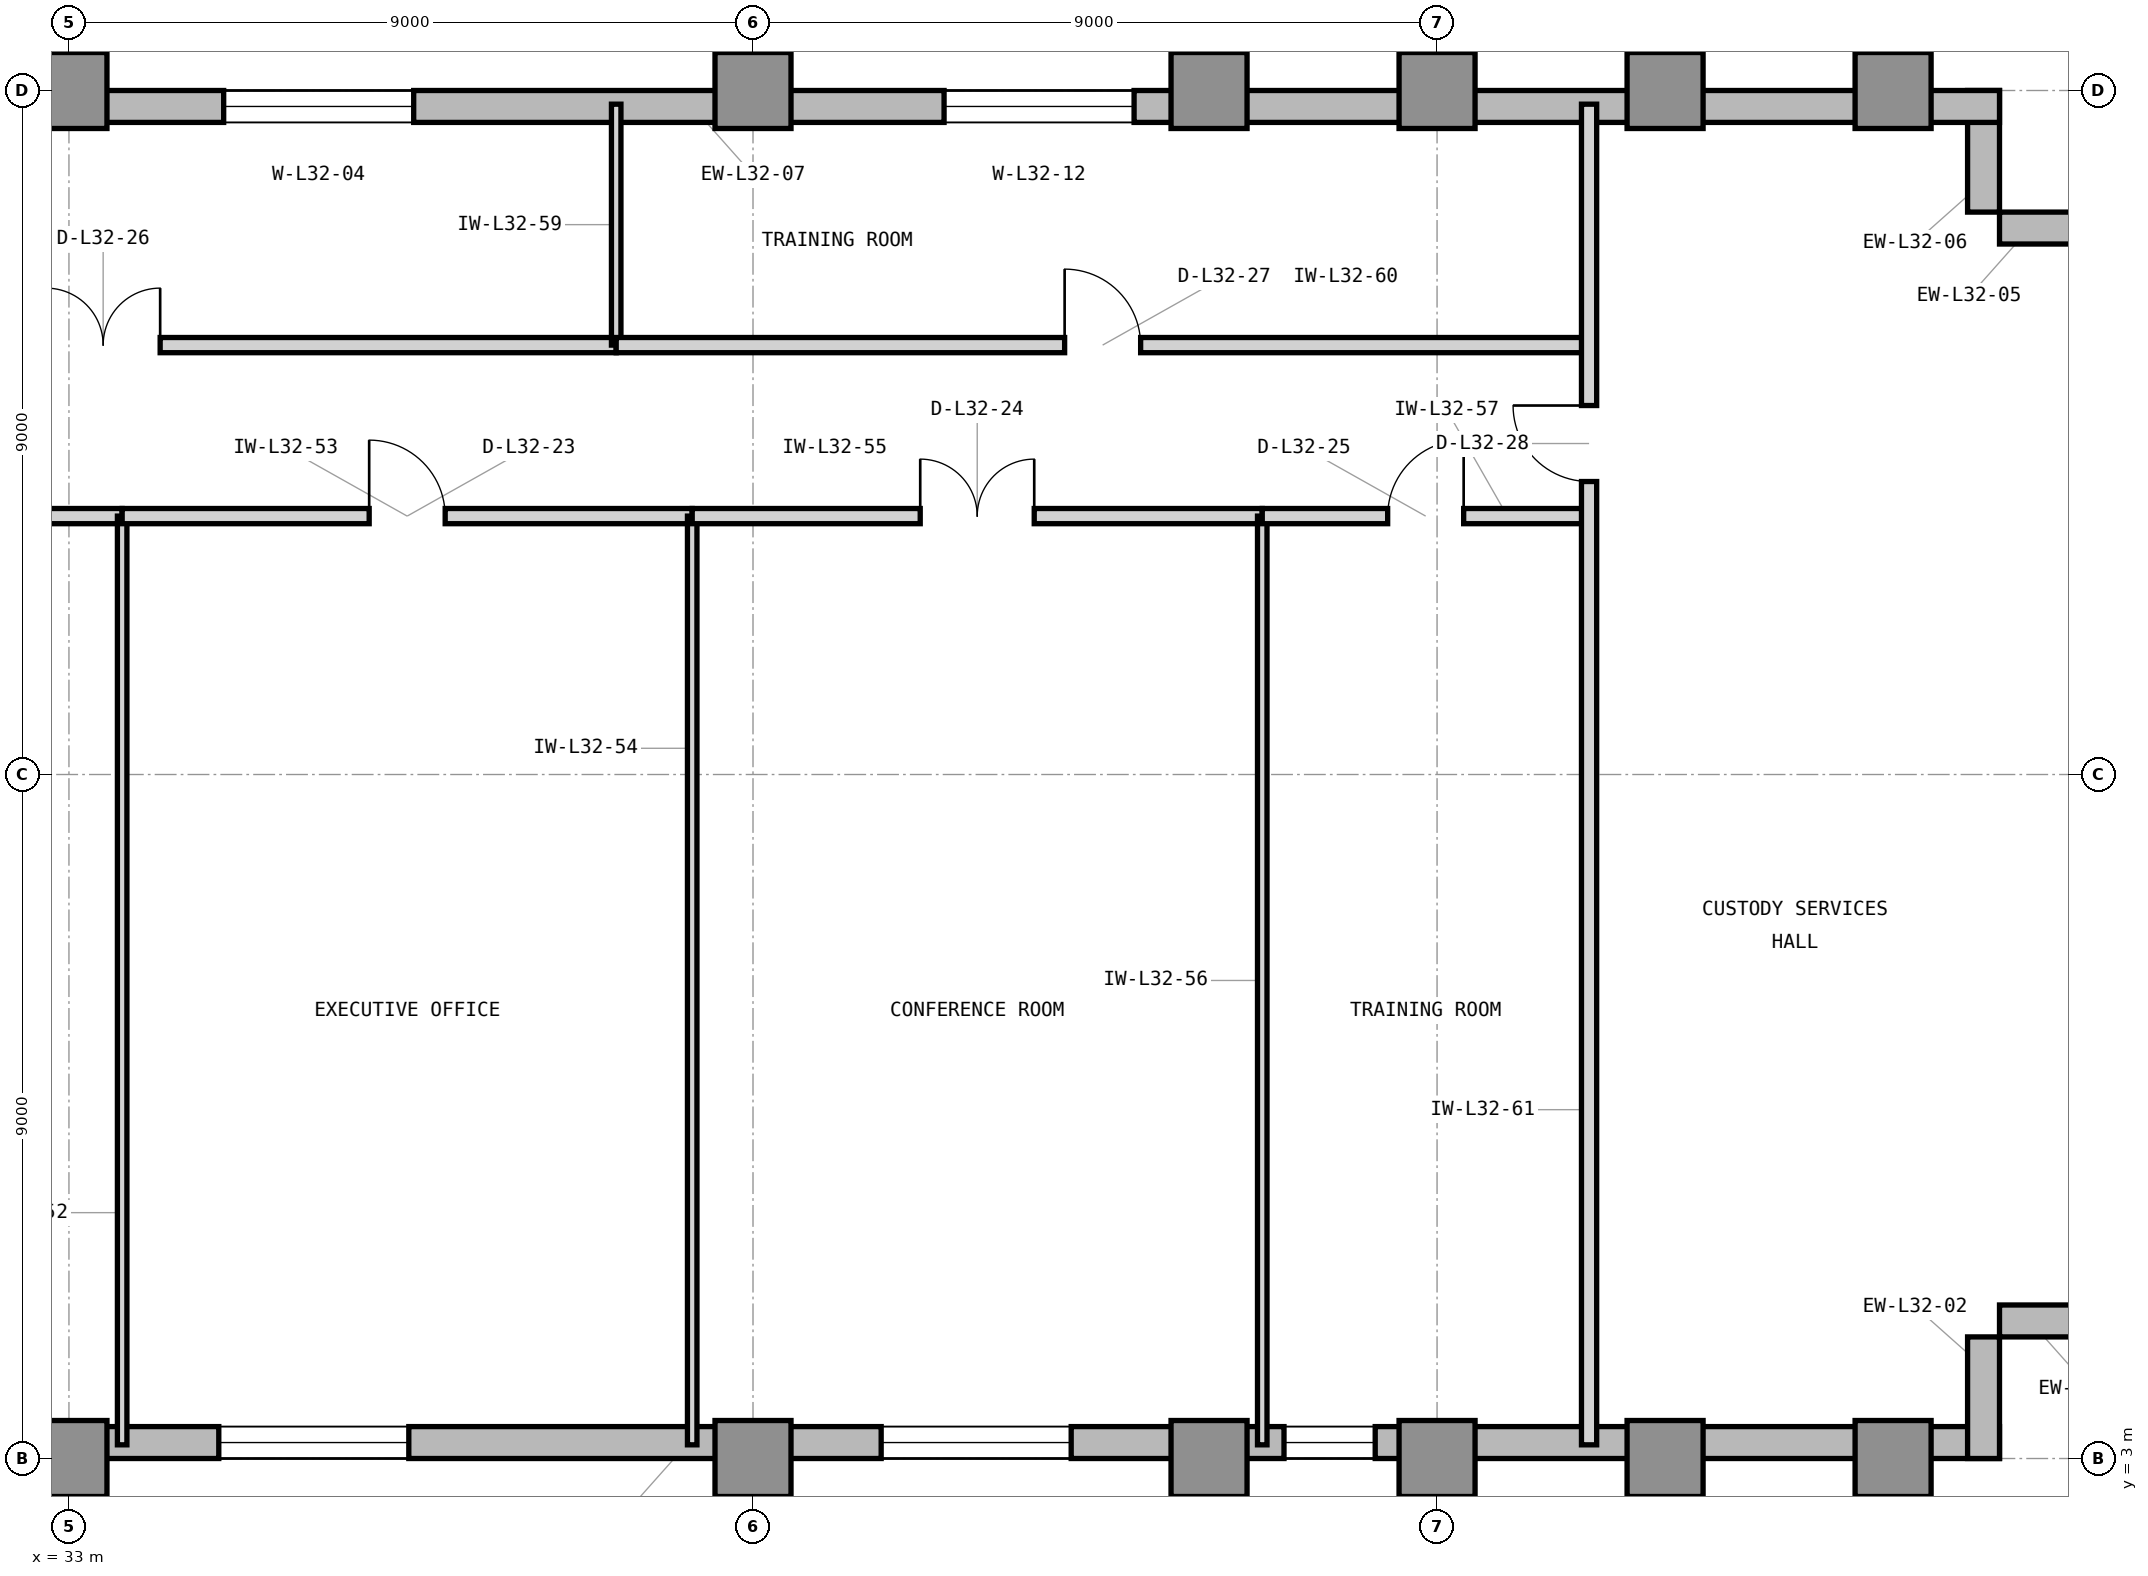
"""IFC4 building model, lengths in metres.
Left out: names, types, materials, properties, quantities, classifications, styles, units other than length and angle.
Written with IfcOpenShell. Run it as: python <this file> out.ifc"""

import sys

from ifc_helpers import new_model, si_unit, direction, frame, frame_2d, origin, origin_2d, place, context, subcontext, project, spatial, rectangle, extrude, element, fill, save


model = new_model("IFC4")
c1 = context("Model", 3, precision=1e-05, world=origin(), true_north=direction((0.0, 1.0)))
c2 = subcontext(c1, "Body", "Model", "MODEL_VIEW")
j1 = project(units=[si_unit("LENGTHUNIT", "METRE"), si_unit("PLANEANGLEUNIT", "RADIAN")], contexts=[c1])
p1 = place(None, origin())
s1 = spatial("IfcSite", under=j1, at=p1, CompositionType="ELEMENT")
p2 = place(p1, origin())
s2 = spatial("IfcBuilding", under=s1, at=p2, CompositionType="ELEMENT")
p3 = place(p2, frame((0.0, 0.0, 136.2)))
s3 = spatial("IfcBuildingStorey", under=s2, at=p3, CompositionType="ELEMENT", Elevation=136.2)
for number, where, z_axis, x_axis in (
    (1, (33.0, 3.0, 0.0), (0.0, 0.0, 1.0), (1.0, 0.0, 0.0)),
    (2, (33.0, 21.0, 0.0), (0.0, 0.0, 1.0), (1.0, 0.0, 0.0)),
    (3, (42.0, 3.0, 0.0), (0.0, 0.0, 1.0), (1.0, 0.0, 0.0)),
    (4, (42.0, 21.0, 0.0), (0.0, 0.0, 1.0), (1.0, 0.0, 0.0)),
    (5, (48.0, 3.0, 0.0), (0.0, 0.0, 1.0), (1.0, 0.0, 0.0)),
    (6, (48.0, 21.0, 0.0), (0.0, 0.0, 1.0), (1.0, 0.0, 0.0)),
    (7, (51.0, 3.0, 0.0), (0.0, 0.0, 1.0), (1.0, 0.0, 0.0)),
    (8, (51.0, 21.0, 0.0), (0.0, 0.0, 1.0), (1.0, 0.0, 0.0)),
    (9, (54.0, 3.0, 0.0), (0.0, 0.0, 1.0), (1.0, 0.0, 0.0)),
    (10, (54.0, 21.0, 0.0), (0.0, 0.0, 1.0), (1.0, 0.0, 0.0)),
    (11, (57.0, 3.0, 0.0), (0.0, 0.0, 1.0), (1.0, 0.0, 0.0)),
    (12, (57.0, 21.0, 0.0), (0.0, 0.0, 1.0), (1.0, 0.0, 0.0)),
):
    element("IfcColumn", number, at=place(p3, frame(where, z_axis=z_axis, x_axis=x_axis)), inside=s3, PredefinedType="COLUMN", context=c2, shape_type="SweptSolid", body=[
        extrude(rectangle(XDim=1.0, YDim=1.0, at=origin_2d()), origin(), (0.0, 0.0, 1.0), 3.9),
    ])
p4 = place(p3, frame((23.9, 3.21, 0.0), z_axis=(0.0, 0.0, 1.0), x_axis=(1.0, 0.0, 0.0)))
e13 = element("IfcWall", 13, at=p4, inside=s3, PredefinedType="STANDARD", context=c2, shape_type="SweptSolid", body=[
    extrude(rectangle(XDim=34.5, YDim=0.42, at=frame_2d((17.25, 0.0))), origin(), (0.0, 0.0, 1.0), 3.7),
])
p5 = place(p4, frame((11.071, 0.0, 0.85)))
e14 = element("IfcOpeningElement", 14, at=p5, cuts=e13, PredefinedType="OPENING", context=c2, shape_type="SweptSolid", body=[
    extrude(rectangle(XDim=2.5, YDim=2.25, at=frame_2d((1.25, 1.125))), frame((0.0, 0.22, 0.0), z_axis=(0.0, -1.0, 0.0), x_axis=(1.0, 0.0, 0.0)), (0.0, 0.0, 1.0), 0.44),
])
p6 = place(p4, frame((1.1, 0.0, 0.85)))
e15 = element("IfcOpeningElement", 15, at=p6, cuts=e13, PredefinedType="OPENING", context=c2, shape_type="SweptSolid", body=[
    extrude(rectangle(XDim=1.2, YDim=2.25, at=frame_2d((0.6, 1.125))), frame((0.0, 0.22, 0.0), z_axis=(0.0, -1.0, 0.0), x_axis=(1.0, 0.0, 0.0)), (0.0, 0.0, 1.0), 0.44),
])
p7 = place(p4, frame((5.036, 0.0, 0.85)))
e16 = element("IfcOpeningElement", 16, at=p7, cuts=e13, PredefinedType="OPENING", context=c2, shape_type="SweptSolid", body=[
    extrude(rectangle(XDim=2.5, YDim=2.25, at=frame_2d((1.25, 1.125))), frame((0.0, 0.22, 0.0), z_axis=(0.0, -1.0, 0.0), x_axis=(1.0, 0.0, 0.0)), (0.0, 0.0, 1.0), 0.44),
])
p8 = place(p4, frame((19.786, 0.0, 0.85)))
e17 = element("IfcOpeningElement", 17, at=p8, cuts=e13, PredefinedType="OPENING", context=c2, shape_type="SweptSolid", body=[
    extrude(rectangle(XDim=2.5, YDim=2.25, at=frame_2d((1.25, 1.125))), frame((0.0, 0.22, 0.0), z_axis=(0.0, -1.0, 0.0), x_axis=(1.0, 0.0, 0.0)), (0.0, 0.0, 1.0), 0.44),
])
p9 = place(p4, frame((25.086, 0.0, 0.85)))
e18 = element("IfcOpeningElement", 18, at=p9, cuts=e13, PredefinedType="OPENING", context=c2, shape_type="SweptSolid", body=[
    extrude(rectangle(XDim=1.2, YDim=2.25, at=frame_2d((0.6, 1.125))), frame((0.0, 0.22, 0.0), z_axis=(0.0, -1.0, 0.0), x_axis=(1.0, 0.0, 0.0)), (0.0, 0.0, 1.0), 0.44),
])
for number, where, z_axis, x_axis in (
    (19, (58.19, 3.0, 0.0), (0.0, 0.0, 1.0), (0.0, 1.0, 0.0)),
    (20, (58.4, 4.81, 0.0), (0.0, 0.0, 1.0), (1.0, 0.0, 0.0)),
    (21, (60.0, 19.19, 0.0), (0.0, 0.0, 1.0), (-1.0, 0.0, 0.0)),
    (22, (58.19, 19.4, 0.0), (0.0, 0.0, 1.0), (0.0, 1.0, 0.0)),
):
    element("IfcWall", number, at=place(p3, frame(where, z_axis=z_axis, x_axis=x_axis)), inside=s3, PredefinedType="STANDARD", context=c2, shape_type="SweptSolid", body=[
        extrude(rectangle(XDim=1.6, YDim=0.42, at=frame_2d((0.8, 0.0))), origin(), (0.0, 0.0, 1.0), 3.7),
    ])
p10 = place(p3, frame((58.4, 20.79, 0.0), z_axis=(0.0, 0.0, 1.0), x_axis=(-1.0, 0.0, 0.0)))
e23 = element("IfcWall", 23, at=p10, inside=s3, PredefinedType="STANDARD", context=c2, shape_type="SweptSolid", body=[
    extrude(rectangle(XDim=34.4, YDim=0.42, at=frame_2d((17.2, 0.0))), origin(), (0.0, 0.0, 1.0), 3.7),
])
p11 = place(p10, frame((20.864, 0.0, 0.85)))
e24 = element("IfcOpeningElement", 24, at=p11, cuts=e23, PredefinedType="OPENING", context=c2, shape_type="SweptSolid", body=[
    extrude(rectangle(XDim=2.5, YDim=2.25, at=frame_2d((1.25, 1.125))), frame((0.0, 0.22, 0.0), z_axis=(0.0, -1.0, 0.0), x_axis=(1.0, 0.0, 0.0)), (0.0, 0.0, 1.0), 0.44),
])
p12 = place(p10, frame((11.386, 0.0, 0.85)))
e25 = element("IfcOpeningElement", 25, at=p12, cuts=e23, PredefinedType="OPENING", context=c2, shape_type="SweptSolid", body=[
    extrude(rectangle(XDim=2.5, YDim=2.25, at=frame_2d((1.25, 1.125))), frame((0.0, 0.22, 0.0), z_axis=(0.0, -1.0, 0.0), x_axis=(1.0, 0.0, 0.0)), (0.0, 0.0, 1.0), 0.44),
])
p13 = place(p3, frame((26.7, 15.4, 0.0), z_axis=(0.0, 0.0, 1.0), x_axis=(1.0, 0.0, 0.0)))
e26 = element("IfcWall", 26, at=p13, inside=s3, PredefinedType="PARTITIONING", context=c2, shape_type="SweptSolid", body=[
    extrude(rectangle(XDim=7.0, YDim=0.2, at=frame_2d((3.5, 0.0))), origin(), (0.0, 0.0, 1.0), 3.69),
])
p14 = place(p13, frame((2.5, 0.0, 0.0)))
e27 = element("IfcOpeningElement", 27, at=p14, cuts=e26, PredefinedType="OPENING", context=c2, shape_type="SweptSolid", body=[
    extrude(rectangle(XDim=2.0, YDim=2.5, at=frame_2d((1.0, 1.25))), frame((0.0, 0.11, 0.0), z_axis=(0.0, -1.0, 0.0), x_axis=(1.0, 0.0, 0.0)), (0.0, 0.0, 1.0), 0.22),
])
p15 = place(p3, frame((33.7, 3.18, 0.0), z_axis=(0.0, 0.0, 1.0), x_axis=(0.0, 1.0, 0.0)))
e28 = element("IfcWall", 28, at=p15, inside=s3, PredefinedType="PARTITIONING", context=c2, shape_type="SweptSolid", body=[
    extrude(rectangle(XDim=12.22, YDim=0.125, at=frame_2d((6.11, 0.0))), origin(), (0.0, 0.0, 1.0), 3.69),
])
p16 = place(p3, frame((33.7, 15.4, 0.0), z_axis=(0.0, 0.0, 1.0), x_axis=(1.0, 0.0, 0.0)))
e29 = element("IfcWall", 29, at=p16, inside=s3, PredefinedType="PARTITIONING", context=c2, shape_type="SweptSolid", body=[
    extrude(rectangle(XDim=7.5, YDim=0.2, at=frame_2d((3.75, 0.0))), origin(), (0.0, 0.0, 1.0), 3.69),
])
p17 = place(p16, frame((3.25, 0.0, 0.0)))
e30 = element("IfcOpeningElement", 30, at=p17, cuts=e29, PredefinedType="OPENING", context=c2, shape_type="SweptSolid", body=[
    extrude(rectangle(XDim=1.0, YDim=2.15, at=frame_2d((0.5, 1.075))), frame((0.0, 0.11, 0.0), z_axis=(0.0, -1.0, 0.0), x_axis=(1.0, 0.0, 0.0)), (0.0, 0.0, 1.0), 0.22),
])
p18 = place(p3, frame((41.2, 3.18, 0.0), z_axis=(0.0, 0.0, 1.0), x_axis=(0.0, 1.0, 0.0)))
e31 = element("IfcWall", 31, at=p18, inside=s3, PredefinedType="PARTITIONING", context=c2, shape_type="SweptSolid", body=[
    extrude(rectangle(XDim=12.22, YDim=0.125, at=frame_2d((6.11, 0.0))), origin(), (0.0, 0.0, 1.0), 3.69),
])
p19 = place(p3, frame((41.2, 15.4, 0.0), z_axis=(0.0, 0.0, 1.0), x_axis=(1.0, 0.0, 0.0)))
e32 = element("IfcWall", 32, at=p19, inside=s3, PredefinedType="PARTITIONING", context=c2, shape_type="SweptSolid", body=[
    extrude(rectangle(XDim=7.5, YDim=0.2, at=frame_2d((3.75, 0.0))), origin(), (0.0, 0.0, 1.0), 3.69),
])
p20 = place(p19, frame((3.0, 0.0, 0.0)))
e33 = element("IfcOpeningElement", 33, at=p20, cuts=e32, PredefinedType="OPENING", context=c2, shape_type="SweptSolid", body=[
    extrude(rectangle(XDim=1.5, YDim=2.3, at=frame_2d((0.75, 1.15))), frame((0.0, 0.11, 0.0), z_axis=(0.0, -1.0, 0.0), x_axis=(1.0, 0.0, 0.0)), (0.0, 0.0, 1.0), 0.22),
])
p21 = place(p3, frame((48.7, 3.18, 0.0), z_axis=(0.0, 0.0, 1.0), x_axis=(0.0, 1.0, 0.0)))
e34 = element("IfcWall", 34, at=p21, inside=s3, PredefinedType="PARTITIONING", context=c2, shape_type="SweptSolid", body=[
    extrude(rectangle(XDim=12.22, YDim=0.125, at=frame_2d((6.11, 0.0))), origin(), (0.0, 0.0, 1.0), 3.69),
])
p22 = place(p3, frame((48.7, 15.4, 0.0), z_axis=(0.0, 0.0, 1.0), x_axis=(1.0, 0.0, 0.0)))
e35 = element("IfcWall", 35, at=p22, inside=s3, PredefinedType="PARTITIONING", context=c2, shape_type="SweptSolid", body=[
    extrude(rectangle(XDim=4.3, YDim=0.2, at=frame_2d((2.15, 0.0))), origin(), (0.0, 0.0, 1.0), 3.69),
])
p23 = place(p22, frame((1.65, 0.0, 0.0)))
e36 = element("IfcOpeningElement", 36, at=p23, cuts=e35, PredefinedType="OPENING", context=c2, shape_type="SweptSolid", body=[
    extrude(rectangle(XDim=1.0, YDim=2.15, at=frame_2d((0.5, 1.075))), frame((0.0, 0.11, 0.0), z_axis=(0.0, -1.0, 0.0), x_axis=(1.0, 0.0, 0.0)), (0.0, 0.0, 1.0), 0.22),
])
p24 = place(p3, frame((26.7, 17.65, 0.0), z_axis=(0.0, 0.0, 1.0), x_axis=(1.0, 0.0, 0.0)))
e37 = element("IfcWall", 37, at=p24, inside=s3, PredefinedType="PARTITIONING", context=c2, shape_type="SweptSolid", body=[
    extrude(rectangle(XDim=13.5, YDim=0.2, at=frame_2d((6.75, 0.0))), origin(), (0.0, 0.0, 1.0), 3.69),
])
p25 = place(p24, frame((6.0, 0.0, 0.0)))
e38 = element("IfcOpeningElement", 38, at=p25, cuts=e37, PredefinedType="OPENING", context=c2, shape_type="SweptSolid", body=[
    extrude(rectangle(XDim=1.5, YDim=2.3, at=frame_2d((0.75, 1.15))), frame((0.0, 0.11, 0.0), z_axis=(0.0, -1.0, 0.0), x_axis=(1.0, 0.0, 0.0)), (0.0, 0.0, 1.0), 0.22),
])
p26 = place(p3, frame((40.2, 17.65, 0.0), z_axis=(0.0, 0.0, 1.0), x_axis=(0.0, 1.0, 0.0)))
e39 = element("IfcWall", 39, at=p26, inside=s3, PredefinedType="PARTITIONING", context=c2, shape_type="SweptSolid", body=[
    extrude(rectangle(XDim=3.17, YDim=0.125, at=frame_2d((1.585, 0.0))), origin(), (0.0, 0.0, 1.0), 3.69),
])
p27 = place(p3, frame((40.2, 17.65, 0.0), z_axis=(0.0, 0.0, 1.0), x_axis=(1.0, 0.0, 0.0)))
e40 = element("IfcWall", 40, at=p27, inside=s3, PredefinedType="PARTITIONING", context=c2, shape_type="SweptSolid", body=[
    extrude(rectangle(XDim=12.8, YDim=0.2, at=frame_2d((6.4, 0.0))), origin(), (0.0, 0.0, 1.0), 3.69),
])
p28 = place(p27, frame((5.9, 0.0, 0.0)))
e41 = element("IfcOpeningElement", 41, at=p28, cuts=e40, PredefinedType="OPENING", context=c2, shape_type="SweptSolid", body=[
    extrude(rectangle(XDim=1.0, YDim=2.15, at=frame_2d((0.5, 1.075))), frame((0.0, 0.11, 0.0), z_axis=(0.0, -1.0, 0.0), x_axis=(1.0, 0.0, 0.0)), (0.0, 0.0, 1.0), 0.22),
])
p29 = place(p3, frame((53.0, 3.18, 0.0), z_axis=(0.0, 0.0, 1.0), x_axis=(0.0, 1.0, 0.0)))
e42 = element("IfcWall", 42, at=p29, inside=s3, PredefinedType="PARTITIONING", context=c2, shape_type="SweptSolid", body=[
    extrude(rectangle(XDim=17.64, YDim=0.2, at=frame_2d((8.82, 0.0))), origin(), (0.0, 0.0, 1.0), 3.69),
])
p30 = place(p29, frame((12.675, 0.0, 0.0)))
e43 = element("IfcOpeningElement", 43, at=p30, cuts=e42, PredefinedType="OPENING", context=c2, shape_type="SweptSolid", body=[
    extrude(rectangle(XDim=1.0, YDim=2.15, at=frame_2d((0.5, 1.075))), frame((0.0, 0.11, 0.0), z_axis=(0.0, -1.0, 0.0), x_axis=(1.0, 0.0, 0.0)), (0.0, 0.0, 1.0), 0.22),
])
p31 = place(p5, origin())
e44 = element("IfcWindow", 44, at=p31, inside=s3, PartitioningType="SINGLE_PANEL", PredefinedType="WINDOW", context=c2, shape_type="SweptSolid", body=[
    extrude(rectangle(XDim=2.5, YDim=2.25, at=frame_2d((1.25, 1.125))), frame((0.0, 0.11, 0.0), z_axis=(0.0, -1.0, 0.0), x_axis=(1.0, 0.0, 0.0)), (0.0, 0.0, 1.0), 0.06),
])
fill(e14, e44)
p32 = place(p11, origin())
e45 = element("IfcWindow", 45, at=p32, inside=s3, PartitioningType="SINGLE_PANEL", PredefinedType="WINDOW", context=c2, shape_type="SweptSolid", body=[
    extrude(rectangle(XDim=2.5, YDim=2.25, at=frame_2d((1.25, 1.125))), frame((0.0, 0.11, 0.0), z_axis=(0.0, -1.0, 0.0), x_axis=(1.0, 0.0, 0.0)), (0.0, 0.0, 1.0), 0.06),
])
fill(e24, e45)
p33 = place(p17, origin())
e46 = element("IfcDoor", 46, at=p33, inside=s3, OperationType="SINGLE_SWING_LEFT", PredefinedType="DOOR", context=c2, shape_type="SweptSolid", body=[
    extrude(rectangle(XDim=1.0, YDim=2.15, at=frame_2d((0.5, 1.075))), frame((0.0, 0.025, 0.0), z_axis=(0.0, -1.0, 0.0), x_axis=(1.0, 0.0, 0.0)), (0.0, 0.0, 1.0), 0.05),
])
fill(e30, e46)
p34 = place(p20, origin())
e47 = element("IfcDoor", 47, at=p34, inside=s3, OperationType="DOUBLE_DOOR_SINGLE_SWING", PredefinedType="DOOR", context=c2, shape_type="SweptSolid", body=[
    extrude(rectangle(XDim=1.5, YDim=2.3, at=frame_2d((0.75, 1.15))), frame((0.0, 0.025, 0.0), z_axis=(0.0, -1.0, 0.0), x_axis=(1.0, 0.0, 0.0)), (0.0, 0.0, 1.0), 0.05),
])
fill(e33, e47)
p35 = place(p23, origin())
e48 = element("IfcDoor", 48, at=p35, inside=s3, OperationType="SINGLE_SWING_RIGHT", PredefinedType="DOOR", context=c2, shape_type="SweptSolid", body=[
    extrude(rectangle(XDim=1.0, YDim=2.15, at=frame_2d((0.5, 1.075))), frame((0.0, 0.025, 0.0), z_axis=(0.0, -1.0, 0.0), x_axis=(1.0, 0.0, 0.0)), (0.0, 0.0, 1.0), 0.05),
])
fill(e36, e48)
p36 = place(p25, origin())
e49 = element("IfcDoor", 49, at=p36, inside=s3, OperationType="DOUBLE_DOOR_SINGLE_SWING", PredefinedType="DOOR", context=c2, shape_type="SweptSolid", body=[
    extrude(rectangle(XDim=1.5, YDim=2.3, at=frame_2d((0.75, 1.15))), frame((0.0, 0.025, 0.0), z_axis=(0.0, -1.0, 0.0), x_axis=(1.0, 0.0, 0.0)), (0.0, 0.0, 1.0), 0.05),
])
fill(e38, e49)
p37 = place(p28, origin())
e50 = element("IfcDoor", 50, at=p37, inside=s3, OperationType="SINGLE_SWING_LEFT", PredefinedType="DOOR", context=c2, shape_type="SweptSolid", body=[
    extrude(rectangle(XDim=1.0, YDim=2.15, at=frame_2d((0.5, 1.075))), frame((0.0, 0.025, 0.0), z_axis=(0.0, -1.0, 0.0), x_axis=(1.0, 0.0, 0.0)), (0.0, 0.0, 1.0), 0.05),
])
fill(e41, e50)
p38 = place(p30, origin())
e51 = element("IfcDoor", 51, at=p38, inside=s3, OperationType="SINGLE_SWING_RIGHT", PredefinedType="DOOR", context=c2, shape_type="SweptSolid", body=[
    extrude(rectangle(XDim=1.0, YDim=2.15, at=frame_2d((0.5, 1.075))), frame((0.0, 0.025, 0.0), z_axis=(0.0, -1.0, 0.0), x_axis=(1.0, 0.0, 0.0)), (0.0, 0.0, 1.0), 0.05),
])
fill(e43, e51)
p39 = place(p8, origin())
e52 = element("IfcWindow", 52, at=p39, inside=s3, PartitioningType="SINGLE_PANEL", PredefinedType="WINDOW", context=c2, shape_type="SweptSolid", body=[
    extrude(rectangle(XDim=2.5, YDim=2.25, at=frame_2d((1.25, 1.125))), frame((0.0, 0.11, 0.0), z_axis=(0.0, -1.0, 0.0), x_axis=(1.0, 0.0, 0.0)), (0.0, 0.0, 1.0), 0.06),
])
fill(e17, e52)
p40 = place(p9, origin())
e53 = element("IfcWindow", 53, at=p40, inside=s3, PartitioningType="SINGLE_PANEL", PredefinedType="WINDOW", context=c2, shape_type="SweptSolid", body=[
    extrude(rectangle(XDim=1.2, YDim=2.25, at=frame_2d((0.6, 1.125))), frame((0.0, 0.11, 0.0), z_axis=(0.0, -1.0, 0.0), x_axis=(1.0, 0.0, 0.0)), (0.0, 0.0, 1.0), 0.06),
])
fill(e18, e53)
p41 = place(p12, origin())
e54 = element("IfcWindow", 54, at=p41, inside=s3, PartitioningType="SINGLE_PANEL", PredefinedType="WINDOW", context=c2, shape_type="SweptSolid", body=[
    extrude(rectangle(XDim=2.5, YDim=2.25, at=frame_2d((1.25, 1.125))), frame((0.0, 0.11, 0.0), z_axis=(0.0, -1.0, 0.0), x_axis=(1.0, 0.0, 0.0)), (0.0, 0.0, 1.0), 0.06),
])
fill(e25, e54)
save(model, sys.argv[1])
